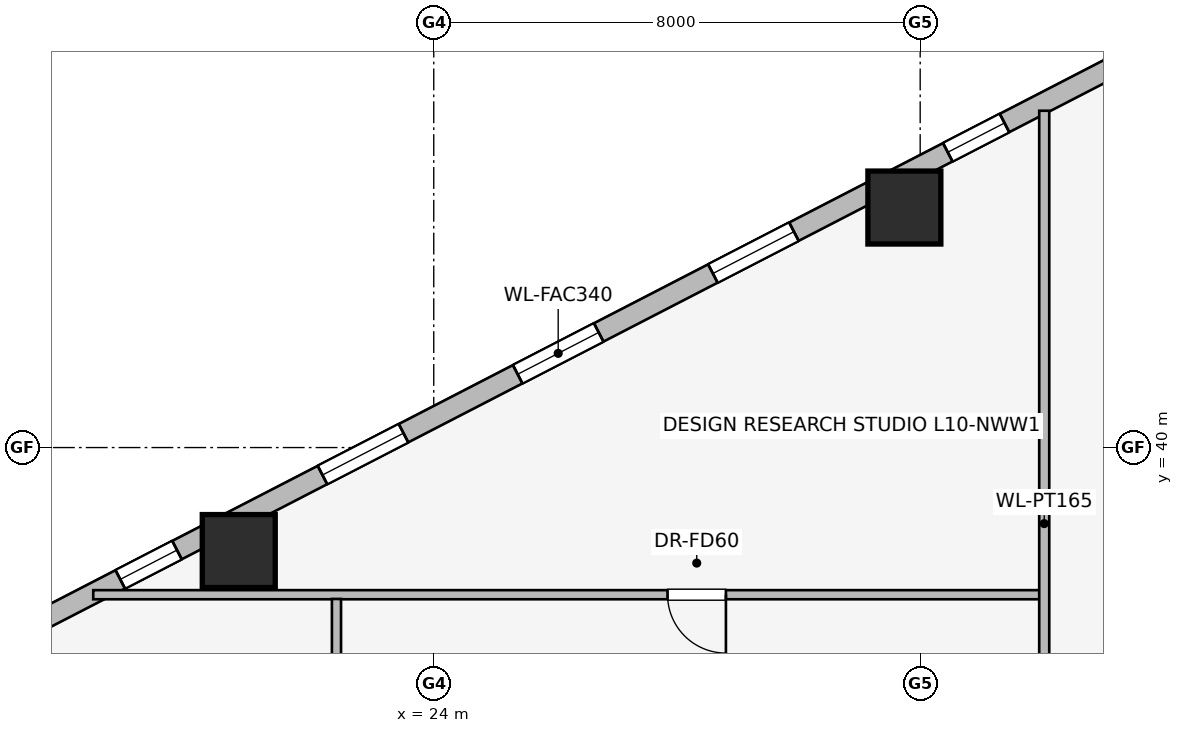
"""IFC4 building model, lengths in metres.
Left out: names, types, materials, properties, quantities, classifications, styles, units other than length and angle.
Written with IfcOpenShell. Run it as: python <this file> out.ifc"""

import sys

from ifc_helpers import new_model, si_unit, direction, frame, frame_2d, origin, origin_2d, place, context, subcontext, project, spatial, rectangle, extrude, element, fill, save


model = new_model("IFC4")
c1 = context("Model", 3, precision=1e-05, world=origin(), true_north=direction((0.0, 1.0)))
c2 = subcontext(c1, "Body", "Model", "MODEL_VIEW")
j1 = project(units=[si_unit("LENGTHUNIT", "METRE"), si_unit("PLANEANGLEUNIT", "RADIAN")], contexts=[c1])
p1 = place(None, origin())
s1 = spatial("IfcSite", under=j1, at=p1, CompositionType="ELEMENT")
p2 = place(p1, origin())
s2 = spatial("IfcBuilding", under=s1, at=p2, CompositionType="ELEMENT")
p3 = place(p2, frame((0.0, 0.0, 41.6)))
s3 = spatial("IfcBuildingStorey", under=s2, at=p3, CompositionType="ELEMENT", Elevation=41.6)
for number, where, z_axis, x_axis in (
    (1, (31.74, 43.947, 0.0), (0.0, 0.0, 1.0), (1.0, 0.0, 0.0)),
    (2, (20.793, 38.298, 0.0), (0.0, 0.0, 1.0), (1.0, 0.0, 0.0)),
):
    element("IfcColumn", number, at=place(p3, frame(where, z_axis=z_axis, x_axis=x_axis)), inside=s3, PredefinedType="COLUMN", context=c2, shape_type="SweptSolid", body=[
        extrude(rectangle(XDim=1.2, YDim=1.2, at=origin_2d()), origin(), (0.0, 0.0, 1.0), 3.65),
    ])
p4 = place(p3, frame((16.924, 36.841, 0.0), z_axis=(0.0, 0.0, 1.0), x_axis=(0.888634413993, 0.458616264721, 0.0)))
e3 = element("IfcWall", 3, at=p4, inside=s3, PredefinedType="STANDARD", context=c2, shape_type="SweptSolid", body=[
    extrude(rectangle(XDim=20.531, YDim=0.34, at=frame_2d((10.266, 0.0))), origin(), (0.0, 0.0, 1.0), 2.684),
])
p5 = place(p4, frame((2.161, 0.0, 0.75)))
e4 = element("IfcOpeningElement", 4, at=p5, cuts=e3, PredefinedType="OPENING", context=c2, shape_type="SweptSolid", body=[
    extrude(rectangle(XDim=1.05, YDim=1.4, at=frame_2d((0.525, 0.7))), frame((0.0, 0.18, 0.0), z_axis=(0.0, -1.0, 0.0), x_axis=(1.0, 0.0, 0.0)), (0.0, 0.0, 1.0), 0.36),
])
p6 = place(p4, frame((5.903, 0.0, 0.75)))
e5 = element("IfcOpeningElement", 5, at=p6, cuts=e3, PredefinedType="OPENING", context=c2, shape_type="SweptSolid", body=[
    extrude(rectangle(XDim=1.5, YDim=1.5, at=frame_2d((0.75, 0.75))), frame((0.0, 0.18, 0.0), z_axis=(0.0, -1.0, 0.0), x_axis=(1.0, 0.0, 0.0)), (0.0, 0.0, 1.0), 0.36),
])
p7 = place(p4, frame((9.516, 0.0, 0.75)))
e6 = element("IfcOpeningElement", 6, at=p7, cuts=e3, PredefinedType="OPENING", context=c2, shape_type="SweptSolid", body=[
    extrude(rectangle(XDim=1.5, YDim=1.5, at=frame_2d((0.75, 0.75))), frame((0.0, 0.18, 0.0), z_axis=(0.0, -1.0, 0.0), x_axis=(1.0, 0.0, 0.0)), (0.0, 0.0, 1.0), 0.36),
])
p8 = place(p4, frame((13.129, 0.0, 0.75)))
e7 = element("IfcOpeningElement", 7, at=p8, cuts=e3, PredefinedType="OPENING", context=c2, shape_type="SweptSolid", body=[
    extrude(rectangle(XDim=1.5, YDim=1.5, at=frame_2d((0.75, 0.75))), frame((0.0, 0.18, 0.0), z_axis=(0.0, -1.0, 0.0), x_axis=(1.0, 0.0, 0.0)), (0.0, 0.0, 1.0), 0.36),
])
p9 = place(p4, frame((17.476, 0.0, 0.75)))
e8 = element("IfcOpeningElement", 8, at=p9, cuts=e3, PredefinedType="OPENING", context=c2, shape_type="SweptSolid", body=[
    extrude(rectangle(XDim=1.05, YDim=1.4, at=frame_2d((0.525, 0.7))), frame((0.0, 0.18, 0.0), z_axis=(0.0, -1.0, 0.0), x_axis=(1.0, 0.0, 0.0)), (0.0, 0.0, 1.0), 0.36),
])
p10 = place(p3, frame((34.0, 37.58, 0.0), z_axis=(0.0, 0.0, 1.0), x_axis=(-1.0, 0.0, 0.0)))
e9 = element("IfcWall", 9, at=p10, inside=s3, PredefinedType="PARTITIONING", context=c2, shape_type="SweptSolid", body=[
    extrude(rectangle(XDim=15.6, YDim=0.15, at=frame_2d((7.8, 0.0))), origin(), (0.0, 0.0, 1.0), 3.39),
])
p11 = place(p10, frame((5.195, 0.0, 0.0)))
e10 = element("IfcOpeningElement", 10, at=p11, cuts=e9, PredefinedType="OPENING", context=c2, shape_type="SweptSolid", body=[
    extrude(rectangle(XDim=0.96, YDim=2.0, at=frame_2d((0.48, 1.0))), frame((0.0, 0.085, 0.0), z_axis=(0.0, -1.0, 0.0), x_axis=(1.0, 0.0, 0.0)), (0.0, 0.0, 1.0), 0.17),
])
p12 = place(p3, frame((34.04, 31.96, 0.0), z_axis=(0.0, 0.0, 1.0), x_axis=(0.0, 1.0, 0.0)))
e11 = element("IfcWall", 11, at=p12, inside=s3, PredefinedType="PARTITIONING", context=c2, shape_type="SweptSolid", body=[
    extrude(rectangle(XDim=13.579, YDim=0.165, at=frame_2d((6.79, 0.0))), origin(), (0.0, 0.0, 1.0), 3.39),
])
p13 = place(p3, frame((22.4, 36.08, 0.0), z_axis=(0.0, 0.0, 1.0), x_axis=(0.0, 1.0, 0.0)))
e12 = element("IfcWall", 12, at=p13, inside=s3, PredefinedType="PARTITIONING", context=c2, shape_type="SweptSolid", body=[
    extrude(rectangle(XDim=1.43, YDim=0.15, at=frame_2d((0.715, 0.0))), origin(), (0.0, 0.0, 1.0), 3.39),
])
p14 = place(p5, origin())
e13 = element("IfcWindow", 13, at=p14, inside=s3, PartitioningType="SINGLE_PANEL", PredefinedType="WINDOW", context=c2, shape_type="SweptSolid", body=[
    extrude(rectangle(XDim=1.05, YDim=1.4, at=frame_2d((0.525, 0.7))), frame((0.0, 0.03, 0.0), z_axis=(0.0, -1.0, 0.0), x_axis=(1.0, 0.0, 0.0)), (0.0, 0.0, 1.0), 0.06),
])
fill(e4, e13)
p15 = place(p6, origin())
e14 = element("IfcWindow", 14, at=p15, inside=s3, PartitioningType="SINGLE_PANEL", PredefinedType="WINDOW", context=c2, shape_type="SweptSolid", body=[
    extrude(rectangle(XDim=1.5, YDim=1.5, at=frame_2d((0.75, 0.75))), frame((0.0, 0.03, 0.0), z_axis=(0.0, -1.0, 0.0), x_axis=(1.0, 0.0, 0.0)), (0.0, 0.0, 1.0), 0.06),
])
fill(e5, e14)
p16 = place(p7, origin())
e15 = element("IfcWindow", 15, at=p16, inside=s3, PartitioningType="SINGLE_PANEL", PredefinedType="WINDOW", context=c2, shape_type="SweptSolid", body=[
    extrude(rectangle(XDim=1.5, YDim=1.5, at=frame_2d((0.75, 0.75))), frame((0.0, 0.03, 0.0), z_axis=(0.0, -1.0, 0.0), x_axis=(1.0, 0.0, 0.0)), (0.0, 0.0, 1.0), 0.06),
])
fill(e6, e15)
p17 = place(p8, origin())
e16 = element("IfcWindow", 16, at=p17, inside=s3, PartitioningType="SINGLE_PANEL", PredefinedType="WINDOW", context=c2, shape_type="SweptSolid", body=[
    extrude(rectangle(XDim=1.5, YDim=1.5, at=frame_2d((0.75, 0.75))), frame((0.0, 0.03, 0.0), z_axis=(0.0, -1.0, 0.0), x_axis=(1.0, 0.0, 0.0)), (0.0, 0.0, 1.0), 0.06),
])
fill(e7, e16)
p18 = place(p9, origin())
e17 = element("IfcWindow", 17, at=p18, inside=s3, PartitioningType="SINGLE_PANEL", PredefinedType="WINDOW", context=c2, shape_type="SweptSolid", body=[
    extrude(rectangle(XDim=1.05, YDim=1.4, at=frame_2d((0.525, 0.7))), frame((0.0, 0.03, 0.0), z_axis=(0.0, -1.0, 0.0), x_axis=(1.0, 0.0, 0.0)), (0.0, 0.0, 1.0), 0.06),
])
fill(e8, e17)
p19 = place(p11, origin())
e18 = element("IfcDoor", 18, at=p19, inside=s3, OperationType="SINGLE_SWING_LEFT", PredefinedType="DOOR", context=c2, shape_type="SweptSolid", body=[
    extrude(rectangle(XDim=0.96, YDim=2.0, at=frame_2d((0.48, 1.0))), frame((0.0, 0.025, 0.0), z_axis=(0.0, -1.0, 0.0), x_axis=(1.0, 0.0, 0.0)), (0.0, 0.0, 1.0), 0.05),
])
fill(e10, e18)
save(model, sys.argv[1])
